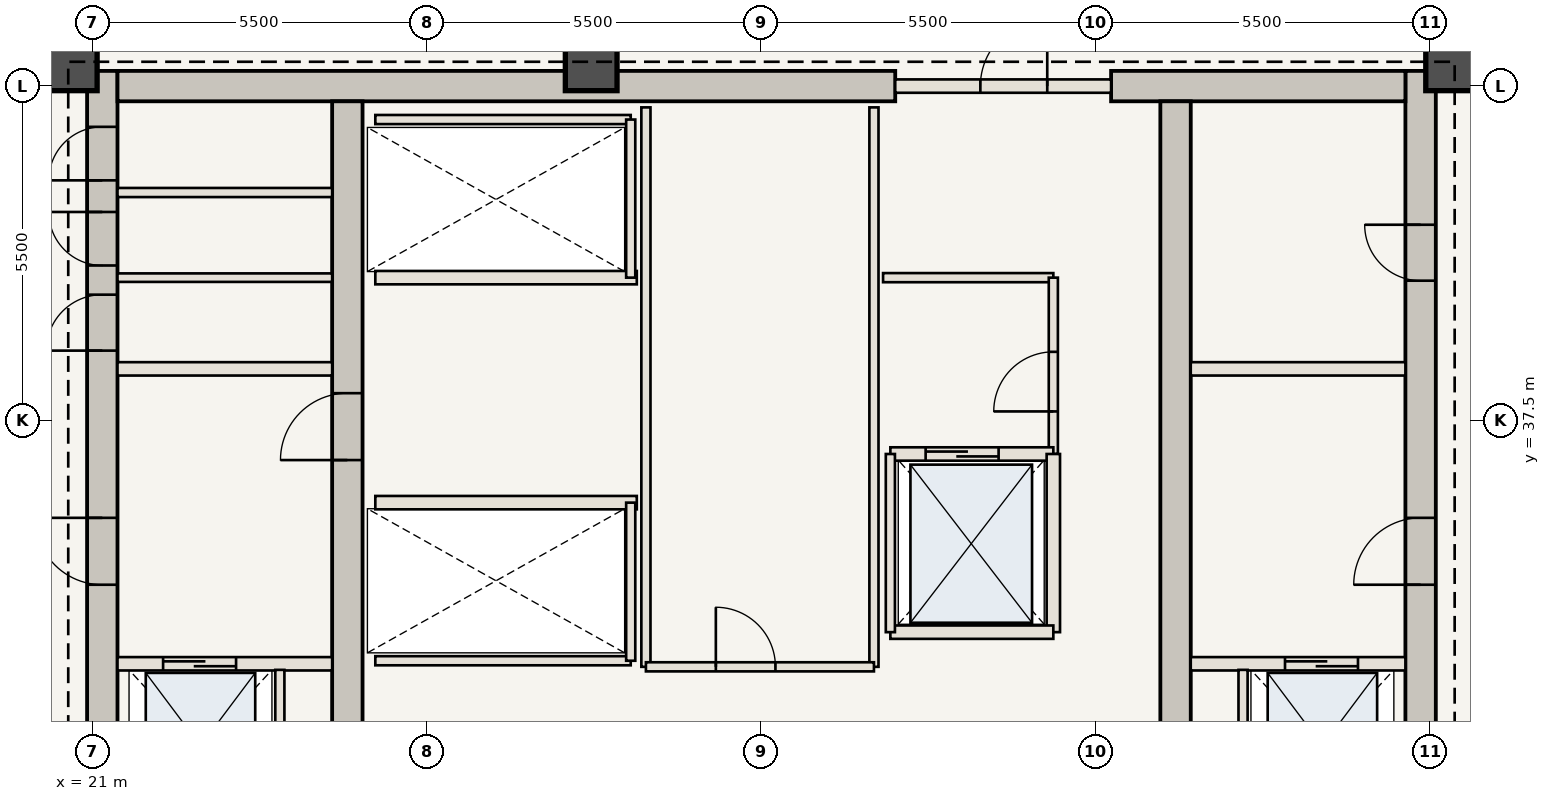
"""IFC4 building model, lengths in metres.
Left out: names, types, materials, properties, quantities, classifications, styles, units other than length and angle.
Written with IfcOpenShell. Run it as: python <this file> out.ifc"""

import sys

from ifc_helpers import new_model, si_unit, direction, frame, frame_2d, origin, origin_2d, place, context, subcontext, project, spatial, rectangle, extrude, element, fill, save


model = new_model("IFC4")
c1 = context("Model", 3, precision=1e-05, world=origin(), true_north=direction((0.0, 1.0)))
c2 = subcontext(c1, "Body", "Model", "MODEL_VIEW")
j1 = project(units=[si_unit("LENGTHUNIT", "METRE"), si_unit("PLANEANGLEUNIT", "RADIAN")], contexts=[c1])
p1 = place(None, origin())
s1 = spatial("IfcSite", under=j1, at=p1, CompositionType="ELEMENT")
p2 = place(p1, origin())
s2 = spatial("IfcBuilding", under=s1, at=p2, CompositionType="ELEMENT")
p3 = place(p2, frame((0.0, 0.0, 221.55)))
s3 = spatial("IfcBuildingStorey", under=s2, at=p3, CompositionType="ELEMENT", Elevation=221.55)
p4 = place(p3, frame((21.16, 30.6, 0.0), z_axis=(0.0, 0.0, 1.0), x_axis=(0.0, 1.0, 0.0)))
e1 = element("IfcWall", 1, at=p4, inside=s3, PredefinedType="SHEAR", context=c2, shape_type="SweptSolid", body=[
    extrude(rectangle(XDim=12.65, YDim=0.5, at=frame_2d((6.325, 0.0))), origin(), (0.0, 0.0, 1.0), 3.85),
])
p5 = place(p4, frame((4.2, 0.0, 0.0)))
e2 = element("IfcOpeningElement", 2, at=p5, cuts=e1, PredefinedType="OPENING", context=c2, shape_type="SweptSolid", body=[
    extrude(rectangle(XDim=1.1, YDim=2.15, at=frame_2d((0.55, 1.075))), frame((0.0, 0.26, 0.0), z_axis=(0.0, -1.0, 0.0), x_axis=(1.0, 0.0, 0.0)), (0.0, 0.0, 1.0), 0.52),
])
p6 = place(p4, frame((8.05, 0.0, 0.0)))
e3 = element("IfcOpeningElement", 3, at=p6, cuts=e1, PredefinedType="OPENING", context=c2, shape_type="SweptSolid", body=[
    extrude(rectangle(XDim=0.92, YDim=2.1, at=frame_2d((0.46, 1.05))), frame((0.0, 0.26, 0.0), z_axis=(0.0, -1.0, 0.0), x_axis=(1.0, 0.0, 0.0)), (0.0, 0.0, 1.0), 0.52),
])
p7 = place(p4, frame((9.45, 0.0, 0.0)))
e4 = element("IfcOpeningElement", 4, at=p7, cuts=e1, PredefinedType="OPENING", context=c2, shape_type="SweptSolid", body=[
    extrude(rectangle(XDim=0.88, YDim=2.1, at=frame_2d((0.44, 1.05))), frame((0.0, 0.26, 0.0), z_axis=(0.0, -1.0, 0.0), x_axis=(1.0, 0.0, 0.0)), (0.0, 0.0, 1.0), 0.52),
])
p8 = place(p4, frame((10.85, 0.0, 0.0)))
e5 = element("IfcOpeningElement", 5, at=p8, cuts=e1, PredefinedType="OPENING", context=c2, shape_type="SweptSolid", body=[
    extrude(rectangle(XDim=0.88, YDim=2.1, at=frame_2d((0.44, 1.05))), frame((0.0, 0.26, 0.0), z_axis=(0.0, -1.0, 0.0), x_axis=(1.0, 0.0, 0.0)), (0.0, 0.0, 1.0), 0.52),
])
p9 = place(p3, frame((42.84, 30.6, 0.0), z_axis=(0.0, 0.0, 1.0), x_axis=(0.0, 1.0, 0.0)))
e6 = element("IfcWall", 6, at=p9, inside=s3, PredefinedType="SHEAR", context=c2, shape_type="SweptSolid", body=[
    extrude(rectangle(XDim=12.65, YDim=0.5, at=frame_2d((6.325, 0.0))), origin(), (0.0, 0.0, 1.0), 3.85),
])
p10 = place(p9, frame((4.2, 0.0, 0.0)))
e7 = element("IfcOpeningElement", 7, at=p10, cuts=e6, PredefinedType="OPENING", context=c2, shape_type="SweptSolid", body=[
    extrude(rectangle(XDim=1.1, YDim=2.15, at=frame_2d((0.55, 1.075))), frame((0.0, 0.26, 0.0), z_axis=(0.0, -1.0, 0.0), x_axis=(1.0, 0.0, 0.0)), (0.0, 0.0, 1.0), 0.52),
])
p11 = place(p9, frame((9.2, 0.0, 0.0)))
e8 = element("IfcOpeningElement", 8, at=p11, cuts=e6, PredefinedType="OPENING", context=c2, shape_type="SweptSolid", body=[
    extrude(rectangle(XDim=0.92, YDim=2.1, at=frame_2d((0.46, 1.05))), frame((0.0, 0.26, 0.0), z_axis=(0.0, -1.0, 0.0), x_axis=(1.0, 0.0, 0.0)), (0.0, 0.0, 1.0), 0.52),
])
p12 = place(p3, frame((21.41, 43.0, 0.0), z_axis=(0.0, 0.0, 1.0), x_axis=(1.0, 0.0, 0.0)))
e9 = element("IfcWall", 9, at=p12, inside=s3, PredefinedType="SHEAR", context=c2, shape_type="SweptSolid", body=[
    extrude(rectangle(XDim=12.79, YDim=0.5, at=frame_2d((6.395, 0.0))), origin(), (0.0, 0.0, 1.0), 3.85),
])
p13 = place(p3, frame((37.75, 43.0, 0.0), z_axis=(0.0, 0.0, 1.0), x_axis=(1.0, 0.0, 0.0)))
e10 = element("IfcWall", 10, at=p13, inside=s3, PredefinedType="SHEAR", context=c2, shape_type="SweptSolid", body=[
    extrude(rectangle(XDim=4.84, YDim=0.5, at=frame_2d((2.42, 0.0))), origin(), (0.0, 0.0, 1.0), 3.85),
])
p14 = place(p3, frame((25.19, 30.6, 0.0), z_axis=(0.0, 0.0, 1.0), x_axis=(0.0, 1.0, 0.0)))
e11 = element("IfcWall", 11, at=p14, inside=s3, PredefinedType="SHEAR", context=c2, shape_type="SweptSolid", body=[
    extrude(rectangle(XDim=12.15, YDim=0.5, at=frame_2d((6.075, 0.0))), origin(), (0.0, 0.0, 1.0), 3.85),
])
p15 = place(p14, frame((6.25, 0.0, 0.0)))
e12 = element("IfcOpeningElement", 12, at=p15, cuts=e11, PredefinedType="OPENING", context=c2, shape_type="SweptSolid", body=[
    extrude(rectangle(XDim=1.1, YDim=2.15, at=frame_2d((0.55, 1.075))), frame((0.0, 0.26, 0.0), z_axis=(0.0, -1.0, 0.0), x_axis=(1.0, 0.0, 0.0)), (0.0, 0.0, 1.0), 0.52),
])
p16 = place(p3, frame((38.81, 30.6, 0.0), z_axis=(0.0, 0.0, 1.0), x_axis=(0.0, 1.0, 0.0)))
e13 = element("IfcWall", 13, at=p16, inside=s3, PredefinedType="SHEAR", context=c2, shape_type="SweptSolid", body=[
    extrude(rectangle(XDim=12.15, YDim=0.5, at=frame_2d((6.075, 0.0))), origin(), (0.0, 0.0, 1.0), 3.85),
])
for number, where, z_axis, x_axis in (
    (14, (43.35, 43.35, 0.0), (0.0, 0.0, 1.0), (1.0, 0.0, 0.0)),
    (15, (29.2, 43.35, 0.0), (0.0, 0.0, 1.0), (1.0, 0.0, 0.0)),
    (16, (20.65, 43.35, 0.0), (0.0, 0.0, 1.0), (1.0, 0.0, 0.0)),
):
    element("IfcColumn", number, at=place(p3, frame(where, z_axis=z_axis, x_axis=x_axis)), inside=s3, PredefinedType="COLUMN", context=c2, shape_type="SweptSolid", body=[
        extrude(rectangle(XDim=0.85, YDim=0.85, at=origin_2d()), origin(), (0.0, 0.0, 1.0), 3.85),
    ])
p17 = place(p3, frame((21.41, 33.5, 0.0), z_axis=(0.0, 0.0, 1.0), x_axis=(1.0, 0.0, 0.0)))
e17 = element("IfcWall", 17, at=p17, inside=s3, PredefinedType="STANDARD", context=c2, shape_type="SweptSolid", body=[
    extrude(rectangle(XDim=3.53, YDim=0.22, at=frame_2d((1.765, 0.0))), origin(), (0.0, 0.0, 1.0), 3.685),
])
p18 = place(p17, frame((0.75, 0.0, 0.0)))
e18 = element("IfcOpeningElement", 18, at=p18, cuts=e17, PredefinedType="OPENING", context=c2, shape_type="SweptSolid", body=[
    extrude(rectangle(XDim=1.2, YDim=2.2, at=frame_2d((0.6, 1.1))), frame((0.0, 0.12, 0.0), z_axis=(0.0, -1.0, 0.0), x_axis=(1.0, 0.0, 0.0)), (0.0, 0.0, 1.0), 0.24),
])
p19 = place(p3, frame((24.08, 30.75, 0.0), z_axis=(0.0, 0.0, 1.0), x_axis=(0.0, 1.0, 0.0)))
e19 = element("IfcWall", 19, at=p19, inside=s3, PredefinedType="STANDARD", context=c2, shape_type="SweptSolid", body=[
    extrude(rectangle(XDim=2.65, YDim=0.15, at=frame_2d((1.325, 0.0))), origin(), (0.0, 0.0, 1.0), 3.685),
])
p20 = place(p3, frame((39.06, 33.5, 0.0), z_axis=(0.0, 0.0, 1.0), x_axis=(1.0, 0.0, 0.0)))
e20 = element("IfcWall", 20, at=p20, inside=s3, PredefinedType="STANDARD", context=c2, shape_type="SweptSolid", body=[
    extrude(rectangle(XDim=3.53, YDim=0.22, at=frame_2d((1.765, 0.0))), origin(), (0.0, 0.0, 1.0), 3.685),
])
p21 = place(p20, frame((1.55, 0.0, 0.0)))
e21 = element("IfcOpeningElement", 21, at=p21, cuts=e20, PredefinedType="OPENING", context=c2, shape_type="SweptSolid", body=[
    extrude(rectangle(XDim=1.2, YDim=2.2, at=frame_2d((0.6, 1.1))), frame((0.0, 0.12, 0.0), z_axis=(0.0, -1.0, 0.0), x_axis=(1.0, 0.0, 0.0)), (0.0, 0.0, 1.0), 0.24),
])
p22 = place(p3, frame((39.92, 30.75, 0.0), z_axis=(0.0, 0.0, 1.0), x_axis=(0.0, 1.0, 0.0)))
e22 = element("IfcWall", 22, at=p22, inside=s3, PredefinedType="STANDARD", context=c2, shape_type="SweptSolid", body=[
    extrude(rectangle(XDim=2.65, YDim=0.15, at=frame_2d((1.325, 0.0))), origin(), (0.0, 0.0, 1.0), 3.685),
])
for number, where, z_axis, x_axis in (
    (23, (21.41, 38.35, 0.0), (0.0, 0.0, 1.0), (1.0, 0.0, 0.0)),
    (24, (39.06, 38.35, 0.0), (0.0, 0.0, 1.0), (1.0, 0.0, 0.0)),
):
    element("IfcWall", number, at=place(p3, frame(where, z_axis=z_axis, x_axis=x_axis)), inside=s3, PredefinedType="STANDARD", context=c2, shape_type="SweptSolid", body=[
        extrude(rectangle(XDim=3.53, YDim=0.22, at=frame_2d((1.765, 0.0))), origin(), (0.0, 0.0, 1.0), 3.685),
    ])
p23 = place(p3, frame((21.41, 39.85, 0.0), z_axis=(0.0, 0.0, 1.0), x_axis=(1.0, 0.0, 0.0)))
e25 = element("IfcWall", 25, at=p23, inside=s3, PredefinedType="STANDARD", context=c2, shape_type="SweptSolid", body=[
    extrude(rectangle(XDim=3.53, YDim=0.14, at=frame_2d((1.765, 0.0))), origin(), (0.0, 0.0, 1.0), 3.685),
])
p24 = place(p3, frame((21.41, 41.25, 0.0), z_axis=(0.0, 0.0, 1.0), x_axis=(1.0, 0.0, 0.0)))
e26 = element("IfcWall", 26, at=p24, inside=s3, PredefinedType="STANDARD", context=c2, shape_type="SweptSolid", body=[
    extrude(rectangle(XDim=3.53, YDim=0.15, at=frame_2d((1.765, 0.0))), origin(), (0.0, 0.0, 1.0), 3.685),
])
p25 = place(p3, frame((34.0, 39.85, 0.0), z_axis=(0.0, 0.0, 1.0), x_axis=(1.0, 0.0, 0.0)))
e27 = element("IfcWall", 27, at=p25, inside=s3, PredefinedType="STANDARD", context=c2, shape_type="SweptSolid", body=[
    extrude(rectangle(XDim=2.8, YDim=0.15, at=frame_2d((1.4, 0.0))), origin(), (0.0, 0.0, 1.0), 3.685),
])
p26 = place(p3, frame((36.8, 36.95, 0.0), z_axis=(0.0, 0.0, 1.0), x_axis=(0.0, 1.0, 0.0)))
e28 = element("IfcWall", 28, at=p26, inside=s3, PredefinedType="STANDARD", context=c2, shape_type="SweptSolid", body=[
    extrude(rectangle(XDim=2.9, YDim=0.15, at=frame_2d((1.45, 0.0))), origin(), (0.0, 0.0, 1.0), 3.685),
])
p27 = place(p26, frame((0.7, 0.0, 0.0)))
e29 = element("IfcOpeningElement", 29, at=p27, cuts=e28, PredefinedType="OPENING", context=c2, shape_type="SweptSolid", body=[
    extrude(rectangle(XDim=0.98, YDim=2.2, at=frame_2d((0.49, 1.1))), frame((0.0, 0.085, 0.0), z_axis=(0.0, -1.0, 0.0), x_axis=(1.0, 0.0, 0.0)), (0.0, 0.0, 1.0), 0.17),
])
p28 = place(p3, frame((25.65, 36.15, 0.0), z_axis=(0.0, 0.0, 1.0), x_axis=(1.0, 0.0, 0.0)))
e30 = element("IfcWall", 30, at=p28, inside=s3, PredefinedType="STANDARD", context=c2, shape_type="SweptSolid", body=[
    extrude(rectangle(XDim=4.3, YDim=0.22, at=frame_2d((2.15, 0.0))), origin(), (0.0, 0.0, 1.0), 3.685),
])
p29 = place(p3, frame((25.65, 33.55, 0.0), z_axis=(0.0, 0.0, 1.0), x_axis=(1.0, 0.0, 0.0)))
e31 = element("IfcWall", 31, at=p29, inside=s3, PredefinedType="STANDARD", context=c2, shape_type="SweptSolid", body=[
    extrude(rectangle(XDim=4.2, YDim=0.15, at=frame_2d((2.1, 0.0))), origin(), (0.0, 0.0, 1.0), 3.685),
])
p30 = place(p3, frame((29.85, 33.55, 0.0), z_axis=(0.0, 0.0, 1.0), x_axis=(0.0, 1.0, 0.0)))
e32 = element("IfcWall", 32, at=p30, inside=s3, PredefinedType="STANDARD", context=c2, shape_type="SweptSolid", body=[
    extrude(rectangle(XDim=2.6, YDim=0.15, at=frame_2d((1.3, 0.0))), origin(), (0.0, 0.0, 1.0), 3.685),
])
p31 = place(p3, frame((25.65, 39.85, 0.0), z_axis=(0.0, 0.0, 1.0), x_axis=(1.0, 0.0, 0.0)))
e33 = element("IfcWall", 33, at=p31, inside=s3, PredefinedType="STANDARD", context=c2, shape_type="SweptSolid", body=[
    extrude(rectangle(XDim=4.3, YDim=0.22, at=frame_2d((2.15, 0.0))), origin(), (0.0, 0.0, 1.0), 3.685),
])
p32 = place(p3, frame((25.65, 42.45, 0.0), z_axis=(0.0, 0.0, 1.0), x_axis=(1.0, 0.0, 0.0)))
e34 = element("IfcWall", 34, at=p32, inside=s3, PredefinedType="STANDARD", context=c2, shape_type="SweptSolid", body=[
    extrude(rectangle(XDim=4.2, YDim=0.15, at=frame_2d((2.1, 0.0))), origin(), (0.0, 0.0, 1.0), 3.685),
])
p33 = place(p3, frame((29.85, 39.85, 0.0), z_axis=(0.0, 0.0, 1.0), x_axis=(0.0, 1.0, 0.0)))
e35 = element("IfcWall", 35, at=p33, inside=s3, PredefinedType="STANDARD", context=c2, shape_type="SweptSolid", body=[
    extrude(rectangle(XDim=2.6, YDim=0.15, at=frame_2d((1.3, 0.0))), origin(), (0.0, 0.0, 1.0), 3.685),
])
for number, where, z_axis, x_axis in (
    (36, (30.1, 33.45, 0.0), (0.0, 0.0, 1.0), (0.0, 1.0, 0.0)),
    (37, (33.85, 33.45, 0.0), (0.0, 0.0, 1.0), (0.0, 1.0, 0.0)),
):
    element("IfcWall", number, at=place(p3, frame(where, z_axis=z_axis, x_axis=x_axis)), inside=s3, PredefinedType="STANDARD", context=c2, shape_type="SweptSolid", body=[
        extrude(rectangle(XDim=9.2, YDim=0.15, at=frame_2d((4.6, 0.0))), origin(), (0.0, 0.0, 1.0), 3.685),
    ])
p34 = place(p3, frame((30.1, 33.45, 0.0), z_axis=(0.0, 0.0, 1.0), x_axis=(1.0, 0.0, 0.0)))
e38 = element("IfcWall", 38, at=p34, inside=s3, PredefinedType="STANDARD", context=c2, shape_type="SweptSolid", body=[
    extrude(rectangle(XDim=3.75, YDim=0.15, at=frame_2d((1.875, 0.0))), origin(), (0.0, 0.0, 1.0), 3.685),
])
p35 = place(p34, frame((1.15, 0.0, 0.0)))
e39 = element("IfcOpeningElement", 39, at=p35, cuts=e38, PredefinedType="OPENING", context=c2, shape_type="SweptSolid", body=[
    extrude(rectangle(XDim=0.98, YDim=2.2, at=frame_2d((0.49, 1.1))), frame((0.0, 0.085, 0.0), z_axis=(0.0, -1.0, 0.0), x_axis=(1.0, 0.0, 0.0)), (0.0, 0.0, 1.0), 0.17),
])
p36 = place(p3, frame((34.2, 43.0, 0.0), z_axis=(0.0, 0.0, 1.0), x_axis=(1.0, 0.0, 0.0)))
e40 = element("IfcWall", 40, at=p36, inside=s3, PredefinedType="STANDARD", context=c2, shape_type="SweptSolid", body=[
    extrude(rectangle(XDim=3.55, YDim=0.22, at=frame_2d((1.775, 0.0))), origin(), (0.0, 0.0, 1.0), 3.685),
])
p37 = place(p36, frame((1.4, 0.0, 0.0)))
e41 = element("IfcOpeningElement", 41, at=p37, cuts=e40, PredefinedType="OPENING", context=c2, shape_type="SweptSolid", body=[
    extrude(rectangle(XDim=1.1, YDim=2.15, at=frame_2d((0.55, 1.075))), frame((0.0, 0.12, 0.0), z_axis=(0.0, -1.0, 0.0), x_axis=(1.0, 0.0, 0.0)), (0.0, 0.0, 1.0), 0.24),
])
p38 = place(p3, frame((34.12, 36.95, 0.0), z_axis=(0.0, 0.0, 1.0), x_axis=(1.0, 0.0, 0.0)))
e42 = element("IfcWall", 42, at=p38, inside=s3, PredefinedType="STANDARD", context=c2, shape_type="SweptSolid", body=[
    extrude(rectangle(XDim=2.68, YDim=0.22, at=frame_2d((1.34, 0.0))), origin(), (0.0, 0.0, 1.0), 3.685),
])
p39 = place(p38, frame((0.58, 0.0, 0.0)))
e43 = element("IfcOpeningElement", 43, at=p39, cuts=e42, PredefinedType="OPENING", context=c2, shape_type="SweptSolid", body=[
    extrude(rectangle(XDim=1.2, YDim=2.2, at=frame_2d((0.6, 1.1))), frame((0.0, 0.12, 0.0), z_axis=(0.0, -1.0, 0.0), x_axis=(1.0, 0.0, 0.0)), (0.0, 0.0, 1.0), 0.24),
])
p40 = place(p3, frame((36.8, 34.02, 0.0), z_axis=(0.0, 0.0, 1.0), x_axis=(0.0, 1.0, 0.0)))
e44 = element("IfcWall", 44, at=p40, inside=s3, PredefinedType="STANDARD", context=c2, shape_type="SweptSolid", body=[
    extrude(rectangle(XDim=2.93, YDim=0.22, at=frame_2d((1.465, 0.0))), origin(), (0.0, 0.0, 1.0), 3.685),
])
p41 = place(p3, frame((34.12, 34.02, 0.0), z_axis=(0.0, 0.0, 1.0), x_axis=(1.0, 0.0, 0.0)))
e45 = element("IfcWall", 45, at=p41, inside=s3, PredefinedType="STANDARD", context=c2, shape_type="SweptSolid", body=[
    extrude(rectangle(XDim=2.68, YDim=0.22, at=frame_2d((1.34, 0.0))), origin(), (0.0, 0.0, 1.0), 3.685),
])
p42 = place(p3, frame((34.12, 34.02, 0.0), z_axis=(0.0, 0.0, 1.0), x_axis=(0.0, 1.0, 0.0)))
e46 = element("IfcWall", 46, at=p42, inside=s3, PredefinedType="STANDARD", context=c2, shape_type="SweptSolid", body=[
    extrude(rectangle(XDim=2.93, YDim=0.15, at=frame_2d((1.465, 0.0))), origin(), (0.0, 0.0, 1.0), 3.685),
])
p43 = place(p5, origin())
e47 = element("IfcDoor", 47, at=p43, inside=s3, OperationType="SINGLE_SWING_RIGHT", PredefinedType="DOOR", context=c2, shape_type="SweptSolid", body=[
    extrude(rectangle(XDim=1.1, YDim=2.15, at=frame_2d((0.55, 1.075))), frame((0.0, 0.025, 0.0), z_axis=(0.0, -1.0, 0.0), x_axis=(1.0, 0.0, 0.0)), (0.0, 0.0, 1.0), 0.05),
])
fill(e2, e47)
p44 = place(p10, origin())
e48 = element("IfcDoor", 48, at=p44, inside=s3, OperationType="SINGLE_SWING_LEFT", PredefinedType="DOOR", context=c2, shape_type="SweptSolid", body=[
    extrude(rectangle(XDim=1.1, YDim=2.15, at=frame_2d((0.55, 1.075))), frame((0.0, 0.025, 0.0), z_axis=(0.0, -1.0, 0.0), x_axis=(1.0, 0.0, 0.0)), (0.0, 0.0, 1.0), 0.05),
])
fill(e7, e48)
p45 = place(p15, origin())
e49 = element("IfcDoor", 49, at=p45, inside=s3, OperationType="SINGLE_SWING_LEFT", PredefinedType="DOOR", context=c2, shape_type="SweptSolid", body=[
    extrude(rectangle(XDim=1.1, YDim=2.15, at=frame_2d((0.55, 1.075))), frame((0.0, 0.025, 0.0), z_axis=(0.0, -1.0, 0.0), x_axis=(1.0, 0.0, 0.0)), (0.0, 0.0, 1.0), 0.05),
])
fill(e12, e49)
p46 = place(p6, origin())
e50 = element("IfcDoor", 50, at=p46, inside=s3, OperationType="SINGLE_SWING_LEFT", PredefinedType="DOOR", context=c2, shape_type="SweptSolid", body=[
    extrude(rectangle(XDim=0.92, YDim=2.1, at=frame_2d((0.46, 1.05))), frame((0.0, 0.025, 0.0), z_axis=(0.0, -1.0, 0.0), x_axis=(1.0, 0.0, 0.0)), (0.0, 0.0, 1.0), 0.05),
])
fill(e3, e50)
p47 = place(p7, origin())
e51 = element("IfcDoor", 51, at=p47, inside=s3, OperationType="SINGLE_SWING_RIGHT", PredefinedType="DOOR", context=c2, shape_type="SweptSolid", body=[
    extrude(rectangle(XDim=0.88, YDim=2.1, at=frame_2d((0.44, 1.05))), frame((0.0, 0.025, 0.0), z_axis=(0.0, -1.0, 0.0), x_axis=(1.0, 0.0, 0.0)), (0.0, 0.0, 1.0), 0.05),
])
fill(e4, e51)
p48 = place(p8, origin())
e52 = element("IfcDoor", 52, at=p48, inside=s3, OperationType="SINGLE_SWING_LEFT", PredefinedType="DOOR", context=c2, shape_type="SweptSolid", body=[
    extrude(rectangle(XDim=0.88, YDim=2.1, at=frame_2d((0.44, 1.05))), frame((0.0, 0.025, 0.0), z_axis=(0.0, -1.0, 0.0), x_axis=(1.0, 0.0, 0.0)), (0.0, 0.0, 1.0), 0.05),
])
fill(e5, e52)
p49 = place(p11, origin())
e53 = element("IfcDoor", 53, at=p49, inside=s3, OperationType="SINGLE_SWING_RIGHT", PredefinedType="DOOR", context=c2, shape_type="SweptSolid", body=[
    extrude(rectangle(XDim=0.92, YDim=2.1, at=frame_2d((0.46, 1.05))), frame((0.0, 0.025, 0.0), z_axis=(0.0, -1.0, 0.0), x_axis=(1.0, 0.0, 0.0)), (0.0, 0.0, 1.0), 0.05),
])
fill(e8, e53)
p50 = place(p18, origin())
e54 = element("IfcDoor", 54, at=p50, inside=s3, OperationType="DOUBLE_DOOR_SLIDING", PredefinedType="DOOR", context=c2, shape_type="SweptSolid", body=[
    extrude(rectangle(XDim=1.2, YDim=2.2, at=frame_2d((0.6, 1.1))), frame((0.0, 0.025, 0.0), z_axis=(0.0, -1.0, 0.0), x_axis=(1.0, 0.0, 0.0)), (0.0, 0.0, 1.0), 0.05),
])
fill(e18, e54)
p51 = place(p21, origin())
e55 = element("IfcDoor", 55, at=p51, inside=s3, OperationType="DOUBLE_DOOR_SLIDING", PredefinedType="DOOR", context=c2, shape_type="SweptSolid", body=[
    extrude(rectangle(XDim=1.2, YDim=2.2, at=frame_2d((0.6, 1.1))), frame((0.0, 0.025, 0.0), z_axis=(0.0, -1.0, 0.0), x_axis=(1.0, 0.0, 0.0)), (0.0, 0.0, 1.0), 0.05),
])
fill(e21, e55)
p52 = place(p27, origin())
e56 = element("IfcDoor", 56, at=p52, inside=s3, OperationType="SINGLE_SWING_LEFT", PredefinedType="DOOR", context=c2, shape_type="SweptSolid", body=[
    extrude(rectangle(XDim=0.98, YDim=2.2, at=frame_2d((0.49, 1.1))), frame((0.0, 0.025, 0.0), z_axis=(0.0, -1.0, 0.0), x_axis=(1.0, 0.0, 0.0)), (0.0, 0.0, 1.0), 0.05),
])
fill(e29, e56)
p53 = place(p35, origin())
e57 = element("IfcDoor", 57, at=p53, inside=s3, OperationType="SINGLE_SWING_LEFT", PredefinedType="DOOR", context=c2, shape_type="SweptSolid", body=[
    extrude(rectangle(XDim=0.98, YDim=2.2, at=frame_2d((0.49, 1.1))), frame((0.0, 0.025, 0.0), z_axis=(0.0, -1.0, 0.0), x_axis=(1.0, 0.0, 0.0)), (0.0, 0.0, 1.0), 0.05),
])
fill(e39, e57)
p54 = place(p37, origin())
e58 = element("IfcDoor", 58, at=p54, inside=s3, OperationType="SINGLE_SWING_RIGHT", PredefinedType="DOOR", context=c2, shape_type="SweptSolid", body=[
    extrude(rectangle(XDim=1.1, YDim=2.15, at=frame_2d((0.55, 1.075))), frame((0.0, 0.025, 0.0), z_axis=(0.0, -1.0, 0.0), x_axis=(1.0, 0.0, 0.0)), (0.0, 0.0, 1.0), 0.05),
])
fill(e41, e58)
p55 = place(p39, origin())
e59 = element("IfcDoor", 59, at=p55, inside=s3, OperationType="DOUBLE_DOOR_SLIDING", PredefinedType="DOOR", context=c2, shape_type="SweptSolid", body=[
    extrude(rectangle(XDim=1.2, YDim=2.2, at=frame_2d((0.6, 1.1))), frame((0.0, 0.025, 0.0), z_axis=(0.0, -1.0, 0.0), x_axis=(1.0, 0.0, 0.0)), (0.0, 0.0, 1.0), 0.05),
])
fill(e43, e59)
save(model, sys.argv[1])
